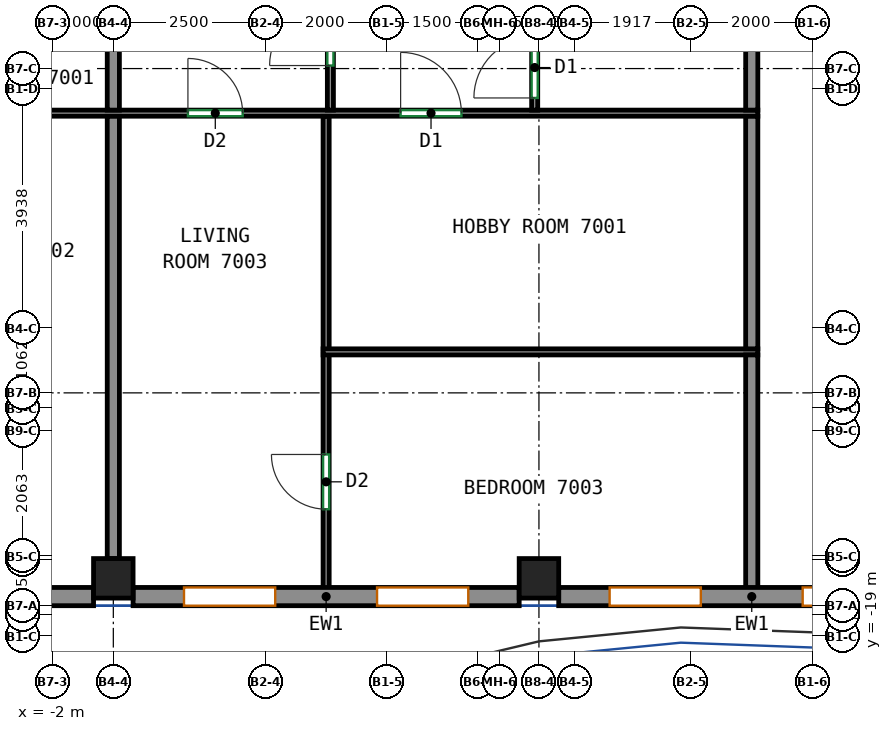
"""IFC4 building model, lengths in metres.
Left out: names, types, materials, properties, quantities, classifications, styles, units other than length and angle.
Written with IfcOpenShell. Run it as: python <this file> out.ifc"""

import sys

from ifc_helpers import new_model, si_unit, direction, frame, frame_2d, origin, origin_2d, place, context, subcontext, project, spatial, rectangle, extrude, source, transform, mapped, element, fill, save


model = new_model("IFC4")
c1 = context("Model", 3, precision=1e-05, world=origin(), true_north=direction((0.0, 1.0)))
c2 = subcontext(c1, "Body", "Model", "MODEL_VIEW")
j1 = project(units=[si_unit("LENGTHUNIT", "METRE"), si_unit("PLANEANGLEUNIT", "RADIAN")], contexts=[c1])
p1 = place(None, origin())
s1 = spatial("IfcSite", under=j1, at=p1, CompositionType="ELEMENT")
p2 = place(p1, origin())
s2 = spatial("IfcBuilding", under=s1, at=p2, CompositionType="ELEMENT")
p3 = place(p2, frame((0.0, 0.0, 284.0)))
s3 = spatial("IfcBuildingStorey", under=s2, at=p3, CompositionType="ELEMENT", Elevation=284.0)
m1 = source(origin(), c2, "Body", "SweptSolid", [
    extrude(rectangle(XDim=0.65, YDim=0.65, at=origin_2d()), origin(), (0.0, 0.0, 1.0), 3.12),
])
for number, where, z_axis, x_axis in (
    (1, (-1.0, -18.05, 0.0), (0.0, 0.0, 1.0), (1.0, 0.0, 0.0)),
    (2, (6.0, -18.05, 0.0), (0.0, 0.0, 1.0), (1.0, 0.0, 0.0)),
):
    element("IfcColumn", number, at=place(p3, frame(where, z_axis=z_axis, x_axis=x_axis)), inside=s3, PredefinedType="COLUMN", context=c2, shape_type="MappedRepresentation", body=[
        mapped(m1, transform((0.0, 0.0, 0.0))),
    ])
m2 = source(origin(), c2, "Body", "SweptSolid", [
    extrude(rectangle(XDim=6.35, YDim=0.3, at=frame_2d((3.175, 0.0))), origin(), (0.0, 0.0, 1.0), 3.12),
])
p4 = place(p3, frame((-7.675, -18.35, 0.0), z_axis=(0.0, 0.0, 1.0), x_axis=(1.0, 0.0, 0.0)))
e3 = element("IfcWall", 3, at=p4, inside=s3, PredefinedType="SOLIDWALL", context=c2, shape_type="MappedRepresentation", body=[
    mapped(m2, transform((0.0, 0.0, 0.0))),
])
p5 = place(p4, frame((0.837, 0.0, 0.8)))
e4 = element("IfcOpeningElement", 4, at=p5, cuts=e3, PredefinedType="OPENING", context=c2, shape_type="SweptSolid", body=[
    extrude(rectangle(XDim=1.5, YDim=2.05, at=frame_2d((0.75, 1.025))), frame((0.0, 0.16, 0.0), z_axis=(0.0, -1.0, 0.0), x_axis=(1.0, 0.0, 0.0)), (0.0, 0.0, 1.0), 0.32),
])
p6 = place(p4, frame((4.012, 0.0, 0.8)))
e5 = element("IfcOpeningElement", 5, at=p6, cuts=e3, PredefinedType="OPENING", context=c2, shape_type="SweptSolid", body=[
    extrude(rectangle(XDim=1.5, YDim=2.05, at=frame_2d((0.75, 1.025))), frame((0.0, 0.16, 0.0), z_axis=(0.0, -1.0, 0.0), x_axis=(1.0, 0.0, 0.0)), (0.0, 0.0, 1.0), 0.32),
])
p7 = place(p3, frame((-0.675, -18.35, 0.0), z_axis=(0.0, 0.0, 1.0), x_axis=(1.0, 0.0, 0.0)))
e6 = element("IfcWall", 6, at=p7, inside=s3, PredefinedType="SOLIDWALL", context=c2, shape_type="MappedRepresentation", body=[
    mapped(m2, transform((0.0, 0.0, 0.0))),
])
p8 = place(p7, frame((0.837, 0.0, 0.8)))
e7 = element("IfcOpeningElement", 7, at=p8, cuts=e6, PredefinedType="OPENING", context=c2, shape_type="SweptSolid", body=[
    extrude(rectangle(XDim=1.5, YDim=2.05, at=frame_2d((0.75, 1.025))), frame((0.0, 0.16, 0.0), z_axis=(0.0, -1.0, 0.0), x_axis=(1.0, 0.0, 0.0)), (0.0, 0.0, 1.0), 0.32),
])
p9 = place(p7, frame((4.012, 0.0, 0.8)))
e8 = element("IfcOpeningElement", 8, at=p9, cuts=e6, PredefinedType="OPENING", context=c2, shape_type="SweptSolid", body=[
    extrude(rectangle(XDim=1.5, YDim=2.05, at=frame_2d((0.75, 1.025))), frame((0.0, 0.16, 0.0), z_axis=(0.0, -1.0, 0.0), x_axis=(1.0, 0.0, 0.0)), (0.0, 0.0, 1.0), 0.32),
])
p10 = place(p3, frame((6.325, -18.35, 0.0), z_axis=(0.0, 0.0, 1.0), x_axis=(1.0, 0.0, 0.0)))
e9 = element("IfcWall", 9, at=p10, inside=s3, PredefinedType="SOLIDWALL", context=c2, shape_type="MappedRepresentation", body=[
    mapped(m2, transform((0.0, 0.0, 0.0))),
])
p11 = place(p10, frame((0.837, 0.0, 0.8)))
e10 = element("IfcOpeningElement", 10, at=p11, cuts=e9, PredefinedType="OPENING", context=c2, shape_type="SweptSolid", body=[
    extrude(rectangle(XDim=1.5, YDim=2.05, at=frame_2d((0.75, 1.025))), frame((0.0, 0.16, 0.0), z_axis=(0.0, -1.0, 0.0), x_axis=(1.0, 0.0, 0.0)), (0.0, 0.0, 1.0), 0.32),
])
p12 = place(p10, frame((4.012, 0.0, 0.8)))
e11 = element("IfcOpeningElement", 11, at=p12, cuts=e9, PredefinedType="OPENING", context=c2, shape_type="SweptSolid", body=[
    extrude(rectangle(XDim=1.5, YDim=2.05, at=frame_2d((0.75, 1.025))), frame((0.0, 0.16, 0.0), z_axis=(0.0, -1.0, 0.0), x_axis=(1.0, 0.0, 0.0)), (0.0, 0.0, 1.0), 0.32),
])
p13 = place(p3, frame((-11.5, -10.4, 0.0), z_axis=(0.0, 0.0, 1.0), x_axis=(1.0, 0.0, 0.0)))
e12 = element("IfcWall", 12, at=p13, inside=s3, PredefinedType="PARTITIONING", context=c2, shape_type="SweptSolid", body=[
    extrude(rectangle(XDim=21.1, YDim=0.1, at=frame_2d((10.55, 0.0))), origin(), (0.0, 0.0, 1.0), 3.12),
])
p14 = place(p13, frame((4.05, 0.0, 0.0)))
e13 = element("IfcOpeningElement", 13, at=p14, cuts=e12, PredefinedType="OPENING", context=c2, shape_type="SweptSolid", body=[
    extrude(rectangle(XDim=1.0, YDim=2.1, at=frame_2d((0.5, 1.05))), frame((0.0, 0.06, 0.0), z_axis=(0.0, -1.0, 0.0), x_axis=(1.0, 0.0, 0.0)), (0.0, 0.0, 1.0), 0.12),
])
p15 = place(p13, frame((11.727, 0.0, 0.0)))
e14 = element("IfcOpeningElement", 14, at=p15, cuts=e12, PredefinedType="OPENING", context=c2, shape_type="SweptSolid", body=[
    extrude(rectangle(XDim=0.9, YDim=2.1, at=frame_2d((0.45, 1.05))), frame((0.0, 0.06, 0.0), z_axis=(0.0, -1.0, 0.0), x_axis=(1.0, 0.0, 0.0)), (0.0, 0.0, 1.0), 0.12),
])
p16 = place(p13, frame((15.225, 0.0, 0.0)))
e15 = element("IfcOpeningElement", 15, at=p16, cuts=e12, PredefinedType="OPENING", context=c2, shape_type="SweptSolid", body=[
    extrude(rectangle(XDim=1.0, YDim=2.1, at=frame_2d((0.5, 1.05))), frame((0.0, 0.06, 0.0), z_axis=(0.0, -1.0, 0.0), x_axis=(1.0, 0.0, 0.0)), (0.0, 0.0, 1.0), 0.12),
])
p17 = place(p3, frame((-1.0, -10.35, 0.0), z_axis=(0.0, 0.0, 1.0), x_axis=(0.0, 1.0, 0.0)))
e16 = element("IfcWall", 16, at=p17, inside=s3, PredefinedType="PARTITIONING", context=c2, shape_type="SweptSolid", body=[
    extrude(rectangle(XDim=2.573, YDim=0.2, at=frame_2d((1.287, 0.0))), origin(), (0.0, 0.0, 1.0), 3.12),
])
p18 = place(p3, frame((-1.0, -17.725, 0.0), z_axis=(0.0, 0.0, 1.0), x_axis=(0.0, 1.0, 0.0)))
e17 = element("IfcWall", 17, at=p18, inside=s3, PredefinedType="PARTITIONING", context=c2, shape_type="SweptSolid", body=[
    extrude(rectangle(XDim=7.273, YDim=0.2, at=frame_2d((3.637, 0.0))), origin(), (0.0, 0.0, 1.0), 3.12),
])
p19 = place(p3, frame((2.57, -10.35, 0.0), z_axis=(0.0, 0.0, 1.0), x_axis=(0.0, 1.0, 0.0)))
e18 = element("IfcWall", 18, at=p19, inside=s3, PredefinedType="PARTITIONING", context=c2, shape_type="SweptSolid", body=[
    extrude(rectangle(XDim=2.573, YDim=0.1, at=frame_2d((1.287, 0.0))), origin(), (0.0, 0.0, 1.0), 3.12),
])
p20 = place(p19, frame((0.733, 0.0, 0.0)))
e19 = element("IfcOpeningElement", 19, at=p20, cuts=e18, PredefinedType="OPENING", context=c2, shape_type="SweptSolid", body=[
    extrude(rectangle(XDim=1.0, YDim=2.1, at=frame_2d((0.5, 1.05))), frame((0.0, 0.06, 0.0), z_axis=(0.0, -1.0, 0.0), x_axis=(1.0, 0.0, 0.0)), (0.0, 0.0, 1.0), 0.12),
])
p21 = place(p3, frame((5.93, -10.35, 0.0), z_axis=(0.0, 0.0, 1.0), x_axis=(0.0, 1.0, 0.0)))
e20 = element("IfcWall", 20, at=p21, inside=s3, PredefinedType="PARTITIONING", context=c2, shape_type="SweptSolid", body=[
    extrude(rectangle(XDim=2.573, YDim=0.1, at=frame_2d((1.287, 0.0))), origin(), (0.0, 0.0, 1.0), 3.12),
])
p22 = place(p21, frame((0.2, 0.0, 0.0)))
e21 = element("IfcOpeningElement", 21, at=p22, cuts=e20, PredefinedType="OPENING", context=c2, shape_type="SweptSolid", body=[
    extrude(rectangle(XDim=1.0, YDim=2.1, at=frame_2d((0.5, 1.05))), frame((0.0, 0.06, 0.0), z_axis=(0.0, -1.0, 0.0), x_axis=(1.0, 0.0, 0.0)), (0.0, 0.0, 1.0), 0.12),
])
p23 = place(p3, frame((9.5, -10.35, 0.0), z_axis=(0.0, 0.0, 1.0), x_axis=(0.0, 1.0, 0.0)))
e22 = element("IfcWall", 22, at=p23, inside=s3, PredefinedType="PARTITIONING", context=c2, shape_type="SweptSolid", body=[
    extrude(rectangle(XDim=2.573, YDim=0.2, at=frame_2d((1.287, 0.0))), origin(), (0.0, 0.0, 1.0), 3.12),
])
p24 = place(p3, frame((2.5, -18.25, 0.0), z_axis=(0.0, 0.0, 1.0), x_axis=(0.0, 1.0, 0.0)))
e23 = element("IfcWall", 23, at=p24, inside=s3, PredefinedType="PARTITIONING", context=c2, shape_type="SweptSolid", body=[
    extrude(rectangle(XDim=3.884, YDim=0.1, at=frame_2d((1.942, 0.0))), origin(), (0.0, 0.0, 1.0), 3.12),
])
p25 = place(p24, frame((1.337, 0.0, 0.0)))
e24 = element("IfcOpeningElement", 24, at=p25, cuts=e23, PredefinedType="OPENING", context=c2, shape_type="SweptSolid", body=[
    extrude(rectangle(XDim=0.9, YDim=2.1, at=frame_2d((0.45, 1.05))), frame((0.0, 0.06, 0.0), z_axis=(0.0, -1.0, 0.0), x_axis=(1.0, 0.0, 0.0)), (0.0, 0.0, 1.0), 0.12),
])
p26 = place(p3, frame((2.5, -14.286, 0.0), z_axis=(0.0, 0.0, 1.0), x_axis=(0.0, 1.0, 0.0)))
e25 = element("IfcWall", 25, at=p26, inside=s3, PredefinedType="PARTITIONING", context=c2, shape_type="SweptSolid", body=[
    extrude(rectangle(XDim=3.834, YDim=0.1, at=frame_2d((1.917, 0.0))), origin(), (0.0, 0.0, 1.0), 3.12),
])
p27 = place(p3, frame((9.6, -14.326, 0.0), z_axis=(0.0, 0.0, 1.0), x_axis=(-1.0, 0.0, 0.0)))
e26 = element("IfcWall", 26, at=p27, inside=s3, PredefinedType="PARTITIONING", context=c2, shape_type="SweptSolid", body=[
    extrude(rectangle(XDim=7.15, YDim=0.1, at=frame_2d((3.575, 0.0))), origin(), (0.0, 0.0, 1.0), 3.12),
])
p28 = place(p3, frame((9.5, -18.25, 0.0), z_axis=(0.0, 0.0, 1.0), x_axis=(0.0, 1.0, 0.0)))
e27 = element("IfcWall", 27, at=p28, inside=s3, PredefinedType="PARTITIONING", context=c2, shape_type="SweptSolid", body=[
    extrude(rectangle(XDim=3.874, YDim=0.2, at=frame_2d((1.937, 0.0))), origin(), (0.0, 0.0, 1.0), 3.12),
])
p29 = place(p3, frame((9.5, -14.276, 0.0), z_axis=(0.0, 0.0, 1.0), x_axis=(0.0, 1.0, 0.0)))
e28 = element("IfcWall", 28, at=p29, inside=s3, PredefinedType="PARTITIONING", context=c2, shape_type="SweptSolid", body=[
    extrude(rectangle(XDim=3.824, YDim=0.2, at=frame_2d((1.912, 0.0))), origin(), (0.0, 0.0, 1.0), 3.12),
])
p30 = place(p8, origin())
e29 = element("IfcWindow", 29, at=p30, inside=s3, PartitioningType="SINGLE_PANEL", PredefinedType="WINDOW", context=c2, shape_type="SweptSolid", body=[
    extrude(rectangle(XDim=1.5, YDim=2.05, at=frame_2d((0.75, 1.025))), frame((0.0, 0.03, 0.0), z_axis=(0.0, -1.0, 0.0), x_axis=(1.0, 0.0, 0.0)), (0.0, 0.0, 1.0), 0.06),
])
fill(e7, e29)
p31 = place(p9, origin())
e30 = element("IfcWindow", 30, at=p31, inside=s3, PartitioningType="SINGLE_PANEL", PredefinedType="WINDOW", context=c2, shape_type="SweptSolid", body=[
    extrude(rectangle(XDim=1.5, YDim=2.05, at=frame_2d((0.75, 1.025))), frame((0.0, 0.03, 0.0), z_axis=(0.0, -1.0, 0.0), x_axis=(1.0, 0.0, 0.0)), (0.0, 0.0, 1.0), 0.06),
])
fill(e8, e30)
p32 = place(p11, origin())
e31 = element("IfcWindow", 31, at=p32, inside=s3, PartitioningType="SINGLE_PANEL", PredefinedType="WINDOW", context=c2, shape_type="SweptSolid", body=[
    extrude(rectangle(XDim=1.5, YDim=2.05, at=frame_2d((0.75, 1.025))), frame((0.0, 0.03, 0.0), z_axis=(0.0, -1.0, 0.0), x_axis=(1.0, 0.0, 0.0)), (0.0, 0.0, 1.0), 0.06),
])
fill(e10, e31)
p33 = place(p12, origin())
e32 = element("IfcWindow", 32, at=p33, inside=s3, PartitioningType="SINGLE_PANEL", PredefinedType="WINDOW", context=c2, shape_type="SweptSolid", body=[
    extrude(rectangle(XDim=1.5, YDim=2.05, at=frame_2d((0.75, 1.025))), frame((0.0, 0.03, 0.0), z_axis=(0.0, -1.0, 0.0), x_axis=(1.0, 0.0, 0.0)), (0.0, 0.0, 1.0), 0.06),
])
fill(e11, e32)
p34 = place(p25, origin())
e33 = element("IfcDoor", 33, at=p34, inside=s3, OperationType="SINGLE_SWING_RIGHT", PredefinedType="DOOR", context=c2, shape_type="SweptSolid", body=[
    extrude(rectangle(XDim=0.9, YDim=2.1, at=frame_2d((0.45, 1.05))), frame((0.0, 0.025, 0.0), z_axis=(0.0, -1.0, 0.0), x_axis=(1.0, 0.0, 0.0)), (0.0, 0.0, 1.0), 0.05),
])
fill(e24, e33)
p35 = place(p15, origin())
e34 = element("IfcDoor", 34, at=p35, inside=s3, OperationType="SINGLE_SWING_LEFT", PredefinedType="DOOR", context=c2, shape_type="SweptSolid", body=[
    extrude(rectangle(XDim=0.9, YDim=2.1, at=frame_2d((0.45, 1.05))), frame((0.0, 0.025, 0.0), z_axis=(0.0, -1.0, 0.0), x_axis=(1.0, 0.0, 0.0)), (0.0, 0.0, 1.0), 0.05),
])
fill(e14, e34)
p36 = place(p16, origin())
e35 = element("IfcDoor", 35, at=p36, inside=s3, OperationType="SINGLE_SWING_LEFT", PredefinedType="DOOR", context=c2, shape_type="SweptSolid", body=[
    extrude(rectangle(XDim=1.0, YDim=2.1, at=frame_2d((0.5, 1.05))), frame((0.0, 0.025, 0.0), z_axis=(0.0, -1.0, 0.0), x_axis=(1.0, 0.0, 0.0)), (0.0, 0.0, 1.0), 0.05),
])
fill(e15, e35)
p37 = place(p22, origin())
e36 = element("IfcDoor", 36, at=p37, inside=s3, OperationType="SINGLE_SWING_LEFT", PredefinedType="DOOR", context=c2, shape_type="SweptSolid", body=[
    extrude(rectangle(XDim=1.0, YDim=2.1, at=frame_2d((0.5, 1.05))), frame((0.0, 0.025, 0.0), z_axis=(0.0, -1.0, 0.0), x_axis=(1.0, 0.0, 0.0)), (0.0, 0.0, 1.0), 0.05),
])
fill(e21, e36)
p38 = place(p20, origin())
e37 = element("IfcDoor", 37, at=p38, inside=s3, OperationType="SINGLE_SWING_LEFT", PredefinedType="DOOR", context=c2, shape_type="SweptSolid", body=[
    extrude(rectangle(XDim=1.0, YDim=2.1, at=frame_2d((0.5, 1.05))), frame((0.0, 0.025, 0.0), z_axis=(0.0, -1.0, 0.0), x_axis=(1.0, 0.0, 0.0)), (0.0, 0.0, 1.0), 0.05),
])
fill(e19, e37)
save(model, sys.argv[1])
